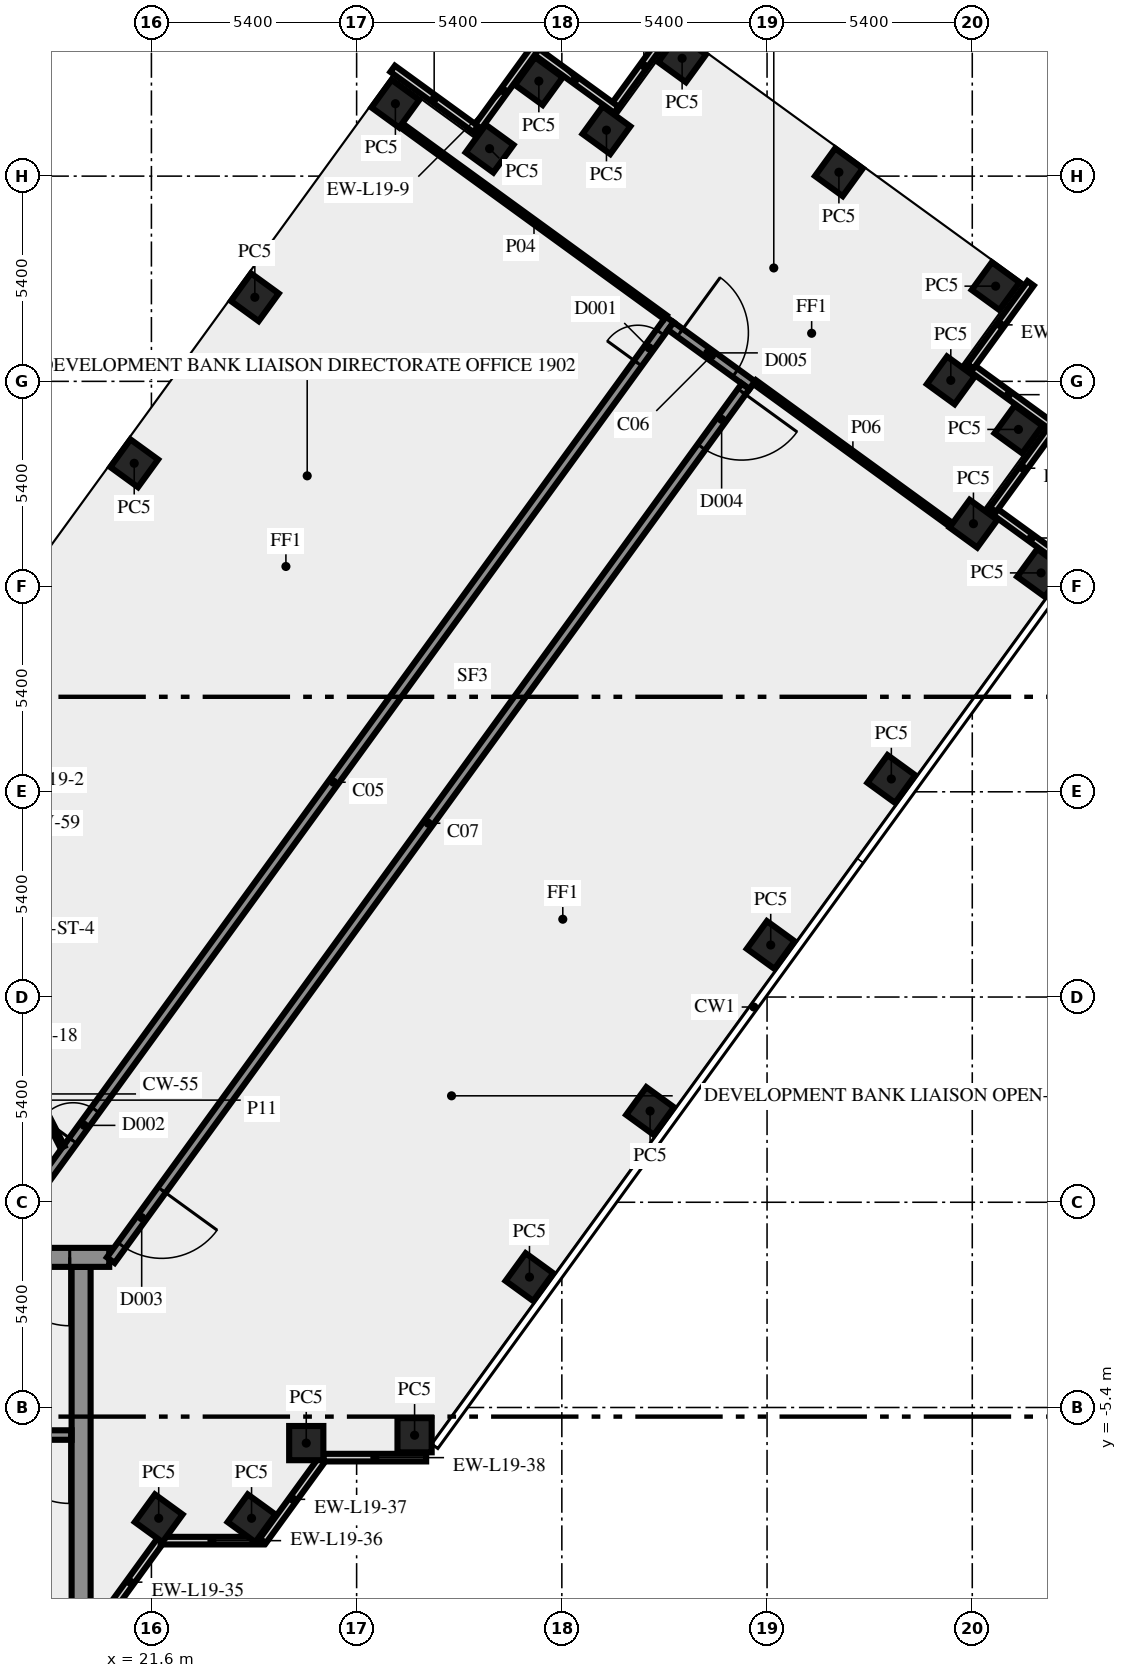
"""IFC4 building model, lengths in metres.
Left out: names, types, materials, properties, quantities, classifications, styles, units other than length and angle.
Written with IfcOpenShell. Run it as: python <this file> out.ifc"""

import sys

from ifc_helpers import new_model, si_unit, direction, frame, frame_2d, origin, origin_2d, place, context, subcontext, project, spatial, rectangle, extrude, element, fill, save


model = new_model("IFC4")
c1 = context("Model", 3, precision=1e-05, world=origin(), true_north=direction((0.0, 1.0)))
c2 = subcontext(c1, "Body", "Model", "MODEL_VIEW")
j1 = project(units=[si_unit("LENGTHUNIT", "METRE"), si_unit("PLANEANGLEUNIT", "RADIAN")], contexts=[c1])
p1 = place(None, origin())
s1 = spatial("IfcSite", under=j1, at=p1, CompositionType="ELEMENT")
p2 = place(p1, origin())
s2 = spatial("IfcBuilding", under=s1, at=p2, CompositionType="ELEMENT")
p3 = place(p2, frame((0.0, 0.0, 85.0)))
s3 = spatial("IfcBuildingStorey", under=s2, at=p3, CompositionType="ELEMENT", Elevation=85.0)
for number, where, z_axis, x_axis in (
    (1, (21.792, -8.315, 0.0), (0.0, 0.0, 1.0), (0.588, 0.809, 0.0)),
    (2, (24.235, -8.315, 0.0), (0.0, 0.0, 1.0), (0.588, 0.809, 0.0)),
    (3, (25.674, -6.337, 0.0), (0.0, 0.0, 1.0), (1.0, 0.0, 0.0)),
    (4, (28.525, -6.13, 0.0), (0.0, 0.0, 1.0), (1.0, 0.0, 0.0)),
    (5, (31.548, -1.969, 0.0), (0.0, 0.0, 1.0), (0.588, 0.809, 0.0)),
    (6, (34.722, 2.4, 0.0), (0.0, 0.0, 1.0), (0.588, 0.809, 0.0)),
    (7, (37.896, 6.769, 0.0), (0.0, 0.0, 1.0), (0.588, 0.809, 0.0)),
    (8, (41.07, 11.137, 0.0), (0.0, 0.0, 1.0), (0.588, 0.809, 0.0)),
    (9, (45.01, 16.56, 0.0), (0.0, 0.0, 1.0), (0.588, 0.809, 0.0)),
    (10, (43.231, 17.854, 0.0), (0.0, 0.0, 1.0), (0.588, 0.809, 0.0)),
    (11, (44.415, 20.335, 0.0), (0.0, 0.0, 1.0), (0.588, 0.809, 0.0)),
    (12, (42.635, 21.626, 0.0), (0.0, 0.0, 1.0), (-0.809, 0.588, 0.0)),
    (13, (43.815, 24.105, 0.0), (0.0, 0.0, 1.0), (-0.809, 0.588, 0.0)),
    (14, (39.691, 27.102, 0.0), (0.0, 0.0, 1.0), (-0.809, 0.588, 0.0)),
    (15, (35.565, 30.1, 0.0), (0.0, 0.0, 1.0), (-0.588, -0.809, 0.0)),
    (16, (33.574, 28.209, 0.0), (0.0, 0.0, 1.0), (-0.809, 0.588, 0.0)),
    (17, (31.795, 29.5, 0.0), (0.0, 0.0, 1.0), (-0.588, -0.809, 0.0)),
    (18, (30.499, 27.723, 0.0), (0.0, 0.0, 1.0), (-0.809, 0.588, 0.0)),
    (19, (28.02, 28.905, 0.0), (0.0, 0.0, 1.0), (-0.809, 0.588, 0.0)),
    (20, (24.321, 23.812, 0.0), (0.0, 0.0, 1.0), (-0.588, -0.809, 0.0)),
    (21, (21.147, 19.444, 0.0), (0.0, 0.0, 1.0), (-0.588, -0.809, 0.0)),
):
    element("IfcColumn", number, at=place(p3, frame(where, z_axis=z_axis, x_axis=x_axis)), inside=s3, PredefinedType="COLUMN", context=c2, shape_type="SweptSolid", body=[
        extrude(rectangle(XDim=0.9, YDim=0.9, at=origin_2d()), origin(), (0.0, 0.0, 1.0), 3.65),
    ])
for number, where, z_axis, x_axis in (
    (22, (45.842, 16.685, 0.0), (0.0, 0.0, 1.0), (-0.809, 0.588, 0.0)),
    (23, (43.746, 18.223, 0.0), (0.0, 0.0, 1.0), (0.588, 0.809, 0.0)),
    (24, (45.245, 20.456, 0.0), (0.0, 0.0, 1.0), (-0.809, 0.588, 0.0)),
    (25, (43.149, 21.994, 0.0), (0.0, 0.0, 1.0), (0.588, 0.809, 0.0)),
    (26, (35.351, 30.997, 0.0), (0.0, 0.0, 1.0), (-0.588, -0.809, 0.0)),
    (27, (33.838, 28.744, 0.0), (0.0, 0.0, 1.0), (-0.809, 0.588, 0.0)),
    (28, (31.67, 30.333, 0.0), (0.0, 0.0, 1.0), (-0.588, -0.809, 0.0)),
    (29, (30.133, 28.237, 0.0), (0.0, 0.0, 1.0), (-0.809, 0.588, 0.0)),
):
    element("IfcWall", number, at=place(p3, frame(where, z_axis=z_axis, x_axis=x_axis)), inside=s3, PredefinedType="SOLIDWALL", context=c2, shape_type="SweptSolid", body=[
        extrude(rectangle(XDim=2.7, YDim=0.2, at=frame_2d((1.35, 0.0))), origin(), (0.0, 0.0, 1.0), 3.65),
    ])
p4 = place(p3, frame((20.253, -11.083, 0.0), z_axis=(0.0, 0.0, 1.0), x_axis=(0.587766567315, 0.809030569476, 0.0)))
e30 = element("IfcWall", 30, at=p4, inside=s3, PredefinedType="SOLIDWALL", context=c2, shape_type="SweptSolid", body=[
    extrude(rectangle(XDim=2.688, YDim=0.2, at=frame_2d((1.344, 0.0))), origin(), (0.0, 0.0, 1.0), 3.65),
])
p5 = place(p3, frame((21.843, -8.904, 0.0), z_axis=(0.0, 0.0, 1.0), x_axis=(1.0, 0.0, 0.0)))
e31 = element("IfcWall", 31, at=p5, inside=s3, PredefinedType="SOLIDWALL", context=c2, shape_type="SweptSolid", body=[
    extrude(rectangle(XDim=2.7, YDim=0.2, at=frame_2d((1.35, 0.0))), origin(), (0.0, 0.0, 1.0), 3.65),
])
p6 = place(p3, frame((24.533, -8.909, 0.0), z_axis=(0.0, 0.0, 1.0), x_axis=(0.587720002413, 0.809064397168, 0.0)))
e32 = element("IfcWall", 32, at=p6, inside=s3, PredefinedType="SOLIDWALL", context=c2, shape_type="SweptSolid", body=[
    extrude(rectangle(XDim=2.7, YDim=0.2, at=frame_2d((1.35, 0.0))), origin(), (0.0, 0.0, 1.0), 3.65),
])
p7 = place(p3, frame((26.13, -6.719, 0.0), z_axis=(0.0, 0.0, 1.0), x_axis=(1.0, 0.0, 0.0)))
e33 = element("IfcWall", 33, at=p7, inside=s3, PredefinedType="SOLIDWALL", context=c2, shape_type="SweptSolid", body=[
    extrude(rectangle(XDim=2.7, YDim=0.2, at=frame_2d((1.35, 0.0))), origin(), (0.0, 0.0, 1.0), 3.65),
])
p8 = place(p3, frame((19.75, -10.5, 0.0), z_axis=(0.0, 0.0, 1.0), x_axis=(0.0, 1.0, 0.0)))
e34 = element("IfcWall", 34, at=p8, inside=s3, PredefinedType="SHEAR", context=c2, shape_type="SweptSolid", body=[
    extrude(rectangle(XDim=8.8, YDim=0.5, at=frame_2d((4.4, 0.0))), origin(), (0.0, 0.0, 1.0), 3.65),
])
p9 = place(p3, frame((19.5, -6.125, 0.0), z_axis=(0.0, 0.0, 1.0), x_axis=(-1.0, 0.0, 0.0)))
e35 = element("IfcWall", 35, at=p9, inside=s3, PredefinedType="SHEAR", context=c2, shape_type="SweptSolid", body=[
    extrude(rectangle(XDim=8.05, YDim=0.25, at=frame_2d((4.025, 0.0))), origin(), (0.0, 0.0, 1.0), 3.65),
])
p10 = place(p9, frame((0.05, 0.0, 0.0)))
e36 = element("IfcOpeningElement", 36, at=p10, cuts=e35, PredefinedType="OPENING", context=c2, shape_type="SweptSolid", body=[
    extrude(rectangle(XDim=1.8, YDim=2.1, at=frame_2d((0.9, 1.05))), frame((0.0, 0.135, 0.0), z_axis=(0.0, -1.0, 0.0), x_axis=(1.0, 0.0, 0.0)), (0.0, 0.0, 1.0), 0.27),
])
p11 = place(p3, frame((20.49, -1.45, 0.0), z_axis=(0.0, 0.0, 1.0), x_axis=(-1.0, 0.0, 0.0)))
e37 = element("IfcWall", 37, at=p11, inside=s3, PredefinedType="SHEAR", context=c2, shape_type="SweptSolid", body=[
    extrude(rectangle(XDim=40.98, YDim=0.5, at=frame_2d((20.49, 0.0))), origin(), (0.0, 0.0, 1.0), 3.65),
])
p12 = place(p11, frame((38.14, 0.0, 0.0)))
e38 = element("IfcOpeningElement", 38, at=p12, cuts=e37, PredefinedType="OPENING", context=c2, shape_type="SweptSolid", body=[
    extrude(rectangle(XDim=1.8, YDim=2.1, at=frame_2d((0.9, 1.05))), frame((0.0, 0.26, 0.0), z_axis=(0.0, -1.0, 0.0), x_axis=(1.0, 0.0, 0.0)), (0.0, 0.0, 1.0), 0.52),
])
p13 = place(p11, frame((35.89, 0.0, 0.0)))
e39 = element("IfcOpeningElement", 39, at=p13, cuts=e37, PredefinedType="OPENING", context=c2, shape_type="SweptSolid", body=[
    extrude(rectangle(XDim=0.9, YDim=2.1, at=frame_2d((0.45, 1.05))), frame((0.0, 0.26, 0.0), z_axis=(0.0, -1.0, 0.0), x_axis=(1.0, 0.0, 0.0)), (0.0, 0.0, 1.0), 0.52),
])
p14 = place(p11, frame((32.94, 0.0, 0.0)))
e40 = element("IfcOpeningElement", 40, at=p14, cuts=e37, PredefinedType="OPENING", context=c2, shape_type="SweptSolid", body=[
    extrude(rectangle(XDim=0.9, YDim=2.1, at=frame_2d((0.45, 1.05))), frame((0.0, 0.26, 0.0), z_axis=(0.0, -1.0, 0.0), x_axis=(1.0, 0.0, 0.0)), (0.0, 0.0, 1.0), 0.52),
])
p15 = place(p11, frame((21.765, 0.0, 0.0)))
e41 = element("IfcOpeningElement", 41, at=p15, cuts=e37, PredefinedType="OPENING", context=c2, shape_type="SweptSolid", body=[
    extrude(rectangle(XDim=2.0, YDim=2.1, at=frame_2d((1.0, 1.05))), frame((0.0, 0.26, 0.0), z_axis=(0.0, -1.0, 0.0), x_axis=(1.0, 0.0, 0.0)), (0.0, 0.0, 1.0), 0.52),
])
p16 = place(p11, frame((7.14, 0.0, 0.0)))
e42 = element("IfcOpeningElement", 42, at=p16, cuts=e37, PredefinedType="OPENING", context=c2, shape_type="SweptSolid", body=[
    extrude(rectangle(XDim=0.9, YDim=2.1, at=frame_2d((0.45, 1.05))), frame((0.0, 0.26, 0.0), z_axis=(0.0, -1.0, 0.0), x_axis=(1.0, 0.0, 0.0)), (0.0, 0.0, 1.0), 0.52),
])
p17 = place(p11, frame((5.028, 0.0, 0.0)))
e43 = element("IfcOpeningElement", 43, at=p17, cuts=e37, PredefinedType="OPENING", context=c2, shape_type="SweptSolid", body=[
    extrude(rectangle(XDim=0.8, YDim=2.1, at=frame_2d((0.4, 1.05))), frame((0.0, 0.26, 0.0), z_axis=(0.0, -1.0, 0.0), x_axis=(1.0, 0.0, 0.0)), (0.0, 0.0, 1.0), 0.52),
])
p18 = place(p11, frame((3.452, 0.0, 0.0)))
e44 = element("IfcOpeningElement", 44, at=p18, cuts=e37, PredefinedType="OPENING", context=c2, shape_type="SweptSolid", body=[
    extrude(rectangle(XDim=0.8, YDim=2.1, at=frame_2d((0.4, 1.05))), frame((0.0, 0.26, 0.0), z_axis=(0.0, -1.0, 0.0), x_axis=(1.0, 0.0, 0.0)), (0.0, 0.0, 1.0), 0.52),
])
p19 = place(p11, frame((1.04, 0.0, 0.0)))
e45 = element("IfcOpeningElement", 45, at=p19, cuts=e37, PredefinedType="OPENING", context=c2, shape_type="SweptSolid", body=[
    extrude(rectangle(XDim=1.8, YDim=2.1, at=frame_2d((0.9, 1.05))), frame((0.0, 0.26, 0.0), z_axis=(0.0, -1.0, 0.0), x_axis=(1.0, 0.0, 0.0)), (0.0, 0.0, 1.0), 0.52),
])
p20 = place(p3, frame((17.545, -1.125, 0.0), z_axis=(0.0, 0.0, 1.0), x_axis=(0.587786330937, 0.809016210693, 0.0)))
e46 = element("IfcWall", 46, at=p20, inside=s3, PredefinedType="SOLIDWALL", context=c2, shape_type="SweptSolid", body=[
    extrude(rectangle(XDim=30.103, YDim=0.25, at=frame_2d((15.052, 0.0))), origin(), (0.0, 0.0, 1.0), 3.65),
])
p21 = place(p20, frame((28.679, 0.0, 0.0)))
e47 = element("IfcOpeningElement", 47, at=p21, cuts=e46, PredefinedType="OPENING", context=c2, shape_type="SweptSolid", body=[
    extrude(rectangle(XDim=1.0, YDim=2.1, at=frame_2d((0.5, 1.05))), frame((0.0, 0.135, 0.0), z_axis=(0.0, -1.0, 0.0), x_axis=(1.0, 0.0, 0.0)), (0.0, 0.0, 1.0), 0.27),
])
p22 = place(p20, frame((3.391, 0.0, 0.0)))
e48 = element("IfcOpeningElement", 48, at=p22, cuts=e46, PredefinedType="OPENING", context=c2, shape_type="SweptSolid", body=[
    extrude(rectangle(XDim=1.0, YDim=2.1, at=frame_2d((0.5, 1.05))), frame((0.0, 0.135, 0.0), z_axis=(0.0, -1.0, 0.0), x_axis=(1.0, 0.0, 0.0)), (0.0, 0.0, 1.0), 0.27),
])
p23 = place(p3, frame((35.267, 23.054, 0.0), z_axis=(0.0, 0.0, 1.0), x_axis=(0.809038743598, -0.587755315891, 0.0)))
e49 = element("IfcWall", 49, at=p23, inside=s3, PredefinedType="SOLIDWALL", context=c2, shape_type="SweptSolid", body=[
    extrude(rectangle(XDim=2.65, YDim=0.25, at=frame_2d((1.325, 0.0))), origin(), (0.0, 0.0, 1.0), 3.65),
])
p24 = place(p23, frame((0.3, 0.0, 0.0)))
e50 = element("IfcOpeningElement", 50, at=p24, cuts=e49, PredefinedType="OPENING", context=c2, shape_type="SweptSolid", body=[
    extrude(rectangle(XDim=1.8, YDim=2.1, at=frame_2d((0.9, 1.05))), frame((0.0, 0.135, 0.0), z_axis=(0.0, -1.0, 0.0), x_axis=(1.0, 0.0, 0.0)), (0.0, 0.0, 1.0), 0.27),
])
p25 = place(p3, frame((37.236, 21.469, 0.0), z_axis=(0.0, 0.0, 1.0), x_axis=(-0.58778344073, -0.809018310549, 0.0)))
e51 = element("IfcWall", 51, at=p25, inside=s3, PredefinedType="SOLIDWALL", context=c2, shape_type="SweptSolid", body=[
    extrude(rectangle(XDim=28.42, YDim=0.25, at=frame_2d((14.21, 0.0))), origin(), (0.0, 0.0, 1.0), 3.65),
])
p26 = place(p25, frame((26.137, 0.0, 0.0)))
e52 = element("IfcOpeningElement", 52, at=p26, cuts=e51, PredefinedType="OPENING", context=c2, shape_type="SweptSolid", body=[
    extrude(rectangle(XDim=1.8, YDim=2.1, at=frame_2d((0.9, 1.05))), frame((0.0, 0.135, 0.0), z_axis=(0.0, -1.0, 0.0), x_axis=(1.0, 0.0, 0.0)), (0.0, 0.0, 1.0), 0.27),
])
p27 = place(p25, frame((0.175, 0.0, 0.0)))
e53 = element("IfcOpeningElement", 53, at=p27, cuts=e51, PredefinedType="OPENING", context=c2, shape_type="SweptSolid", body=[
    extrude(rectangle(XDim=1.8, YDim=2.1, at=frame_2d((0.9, 1.05))), frame((0.0, 0.135, 0.0), z_axis=(0.0, -1.0, 0.0), x_axis=(1.0, 0.0, 0.0)), (0.0, 0.0, 1.0), 0.27),
])
p28 = place(p3, frame((35.126, 23.286, 0.0), z_axis=(0.0, 0.0, 1.0), x_axis=(-0.809022465264, 0.587777722186, 0.0)))
e54 = element("IfcWall", 54, at=p28, inside=s3, PredefinedType="PARTITIONING", context=c2, shape_type="SweptSolid", body=[
    extrude(rectangle(XDim=8.55, YDim=0.12, at=frame_2d((4.275, 0.0))), origin(), (0.0, 0.0, 1.0), 3.65),
])
p29 = place(p3, frame((42.646, 17.823, 0.0), z_axis=(0.0, 0.0, 1.0), x_axis=(-0.80900675786, 0.587799341388, 0.0)))
e55 = element("IfcWall", 55, at=p29, inside=s3, PredefinedType="PARTITIONING", context=c2, shape_type="SweptSolid", body=[
    extrude(rectangle(XDim=6.395, YDim=0.12, at=frame_2d((3.197, 0.0))), origin(), (0.0, 0.0, 1.0), 3.65),
])
p30 = place(p3, frame((18.0, 3.925, 0.0), z_axis=(0.0, 0.0, 1.0), x_axis=(0.453950796792, -0.891026752736, 0.0)))
e56 = element("IfcWall", 56, at=p30, inside=s3, PredefinedType="PARTITIONING", context=c2, shape_type="SweptSolid", body=[
    extrude(rectangle(XDim=2.778, YDim=0.12, at=frame_2d((1.389, 0.0))), origin(), (0.0, 0.0, 1.0), 3.65),
])
p31 = place(p10, origin())
e57 = element("IfcDoor", 57, at=p31, inside=s3, OperationType="DOUBLE_DOOR_SINGLE_SWING", PredefinedType="DOOR", context=c2, shape_type="SweptSolid", body=[
    extrude(rectangle(XDim=1.8, YDim=2.1, at=frame_2d((0.9, 1.05))), frame((0.0, 0.025, 0.0), z_axis=(0.0, -1.0, 0.0), x_axis=(1.0, 0.0, 0.0)), (0.0, 0.0, 1.0), 0.05),
])
fill(e36, e57)
p32 = place(p19, origin())
e58 = element("IfcDoor", 58, at=p32, inside=s3, OperationType="DOUBLE_DOOR_SINGLE_SWING", PredefinedType="DOOR", context=c2, shape_type="SweptSolid", body=[
    extrude(rectangle(XDim=1.8, YDim=2.1, at=frame_2d((0.9, 1.05))), frame((0.0, 0.025, 0.0), z_axis=(0.0, -1.0, 0.0), x_axis=(1.0, 0.0, 0.0)), (0.0, 0.0, 1.0), 0.05),
])
fill(e45, e58)
p33 = place(p21, origin())
e59 = element("IfcDoor", 59, at=p33, inside=s3, OperationType="SINGLE_SWING_RIGHT", PredefinedType="DOOR", context=c2, shape_type="SweptSolid", body=[
    extrude(rectangle(XDim=1.0, YDim=2.1, at=frame_2d((0.5, 1.05))), frame((0.0, 0.025, 0.0), z_axis=(0.0, -1.0, 0.0), x_axis=(1.0, 0.0, 0.0)), (0.0, 0.0, 1.0), 0.05),
])
fill(e47, e59)
p34 = place(p22, origin())
e60 = element("IfcDoor", 60, at=p34, inside=s3, OperationType="SINGLE_SWING_LEFT", PredefinedType="DOOR", context=c2, shape_type="SweptSolid", body=[
    extrude(rectangle(XDim=1.0, YDim=2.1, at=frame_2d((0.5, 1.05))), frame((0.0, 0.025, 0.0), z_axis=(0.0, -1.0, 0.0), x_axis=(1.0, 0.0, 0.0)), (0.0, 0.0, 1.0), 0.05),
])
fill(e48, e60)
p35 = place(p26, origin())
e61 = element("IfcDoor", 61, at=p35, inside=s3, OperationType="DOUBLE_DOOR_SINGLE_SWING", PredefinedType="DOOR", context=c2, shape_type="SweptSolid", body=[
    extrude(rectangle(XDim=1.8, YDim=2.1, at=frame_2d((0.9, 1.05))), frame((0.0, 0.025, 0.0), z_axis=(0.0, -1.0, 0.0), x_axis=(1.0, 0.0, 0.0)), (0.0, 0.0, 1.0), 0.05),
])
fill(e52, e61)
p36 = place(p27, origin())
e62 = element("IfcDoor", 62, at=p36, inside=s3, OperationType="DOUBLE_DOOR_SINGLE_SWING", PredefinedType="DOOR", context=c2, shape_type="SweptSolid", body=[
    extrude(rectangle(XDim=1.8, YDim=2.1, at=frame_2d((0.9, 1.05))), frame((0.0, 0.025, 0.0), z_axis=(0.0, -1.0, 0.0), x_axis=(1.0, 0.0, 0.0)), (0.0, 0.0, 1.0), 0.05),
])
fill(e53, e62)
p37 = place(p24, origin())
e63 = element("IfcDoor", 63, at=p37, inside=s3, OperationType="DOUBLE_DOOR_SINGLE_SWING", PredefinedType="DOOR", context=c2, shape_type="SweptSolid", body=[
    extrude(rectangle(XDim=1.8, YDim=2.1, at=frame_2d((0.9, 1.05))), frame((0.0, 0.025, 0.0), z_axis=(0.0, -1.0, 0.0), x_axis=(1.0, 0.0, 0.0)), (0.0, 0.0, 1.0), 0.05),
])
fill(e50, e63)
save(model, sys.argv[1])
